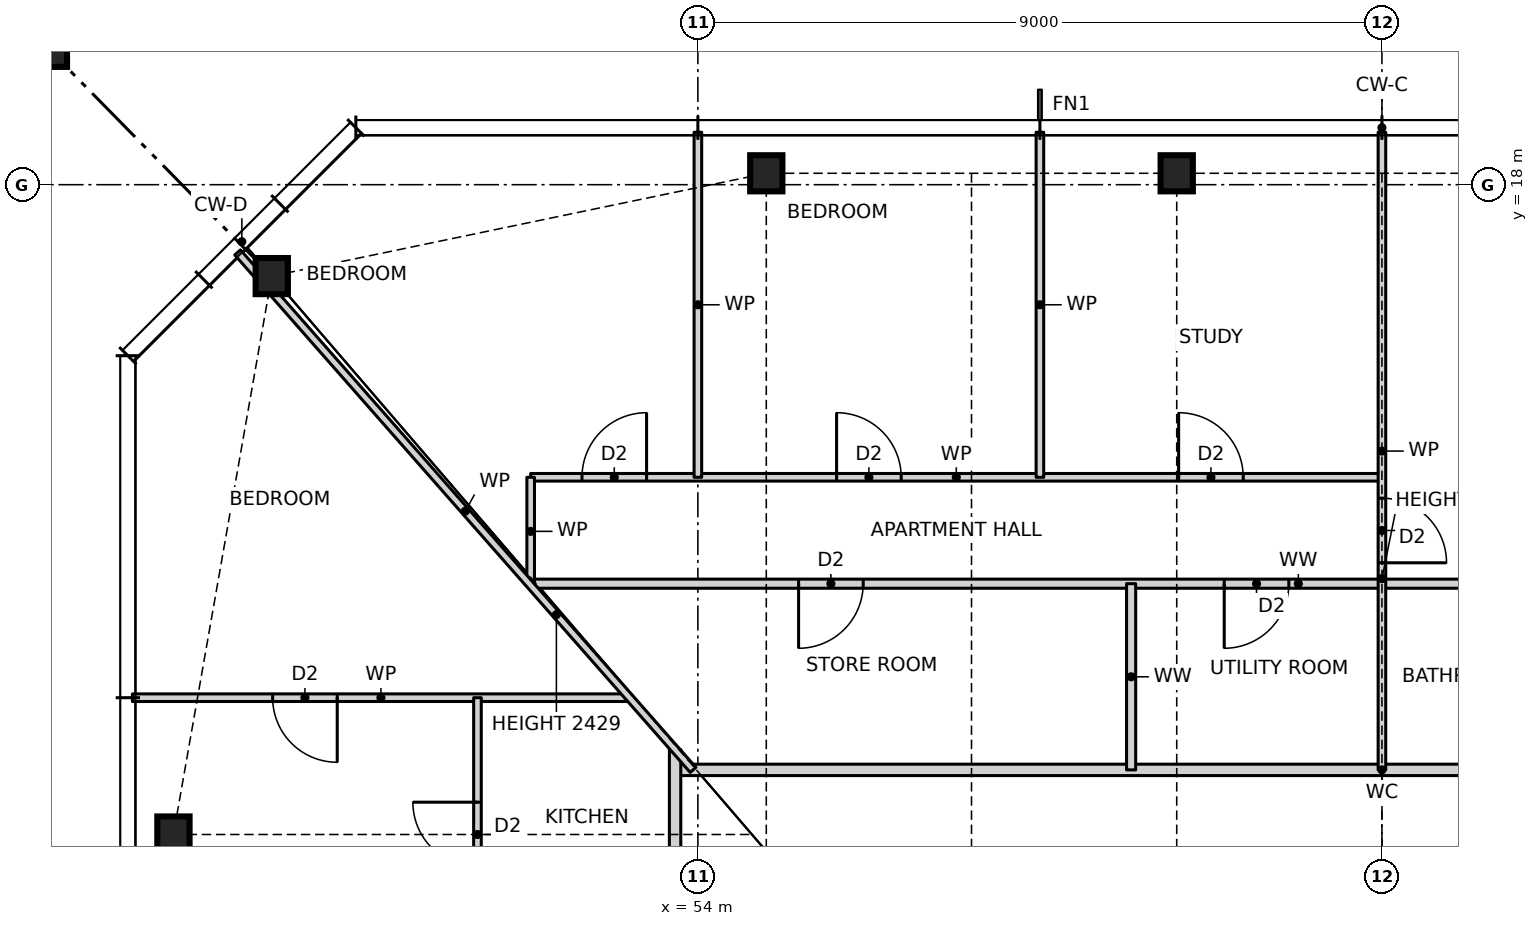
"""IFC4 building model, lengths in metres.
Left out: names, types, materials, properties, quantities, classifications, styles, units other than length and angle.
Written with IfcOpenShell. Run it as: python <this file> out.ifc"""

import sys

from ifc_helpers import new_model, si_unit, direction, frame, frame_2d, origin, origin_2d, place, context, subcontext, project, spatial, rectangle, hollow_rectangle, i_section, extrude, element, fill, save


model = new_model("IFC4")
c1 = context("Model", 3, precision=1e-05, world=origin(), true_north=direction((0.0, 1.0)))
c2 = subcontext(c1, "Body", "Model", "MODEL_VIEW")
j1 = project(units=[si_unit("LENGTHUNIT", "METRE"), si_unit("PLANEANGLEUNIT", "RADIAN")], contexts=[c1])
p1 = place(None, origin())
s1 = spatial("IfcSite", under=j1, at=p1, CompositionType="ELEMENT")
p2 = place(p1, origin())
s2 = spatial("IfcBuilding", under=s1, at=p2, CompositionType="ELEMENT")
p3 = place(p2, frame((0.0, 0.0, 57.0)))
s3 = spatial("IfcBuildingStorey", under=s2, at=p3, CompositionType="ELEMENT", Elevation=57.0)
for number, where, z_axis, x_axis in (
    (1, (60.3, 18.15, 0.0), (0.0, 0.0, 1.0), (1.0, 0.0, 0.0)),
    (2, (54.9, 18.15, 0.0), (0.0, 0.0, 1.0), (1.0, 0.0, 0.0)),
    (3, (48.394, 16.797, 0.0), (0.0, 0.0, 1.0), (1.0, 0.0, 0.0)),
    (4, (47.1, 9.45, 0.0), (0.0, 0.0, 1.0), (1.0, 0.0, 0.0)),
):
    element("IfcColumn", number, at=place(p3, frame(where, z_axis=z_axis, x_axis=x_axis)), inside=s3, PredefinedType="COLUMN", context=c2, shape_type="SweptSolid", body=[
        extrude(i_section(OverallWidth=0.424, OverallDepth=0.475, WebThickness=0.048, FlangeThickness=0.077, at=origin_2d()), origin(), (0.0, 0.0, 1.0), 3.5),
    ])
p4 = place(p3, frame((45.1, 20.15, 0.0), z_axis=(0.0, 0.0, 1.0), x_axis=(1.0, 0.0, 0.0)))
e5 = element("IfcColumn", 5, at=p4, inside=s3, PredefinedType="COLUMN", context=c2, shape_type="SweptSolid", body=[
    extrude(hollow_rectangle(XDim=1.2, YDim=1.2, WallThickness=0.07, at=origin_2d()), origin(), (0.0, 0.0, 1.0), 3.5),
])
p5 = place(p3, frame((53.7, 10.3, 0.0), z_axis=(0.0, 0.0, 1.0), x_axis=(1.0, 0.0, 0.0)))
e6 = element("IfcWall", 6, at=p5, inside=s3, PredefinedType="PARTITIONING", context=c2, shape_type="SweptSolid", body=[
    extrude(rectangle(XDim=18.6, YDim=0.15, at=frame_2d((9.3, 0.0))), origin(), (0.0, 0.0, 1.0), 3.27),
])
p6 = place(p5, frame((12.8, 0.0, 0.0)))
e7 = element("IfcOpeningElement", 7, at=p6, cuts=e6, PredefinedType="OPENING", context=c2, shape_type="SweptSolid", body=[
    extrude(rectangle(XDim=1.0, YDim=2.1, at=frame_2d((0.5, 1.05))), frame((0.0, 0.085, 0.0), z_axis=(0.0, -1.0, 0.0), x_axis=(1.0, 0.0, 0.0)), (0.0, 0.0, 1.0), 0.17),
])
p7 = place(p3, frame((46.56, 11.25, 0.0), z_axis=(0.0, 0.0, 1.0), x_axis=(1.0, 0.0, 0.0)))
e8 = element("IfcWall", 8, at=p7, inside=s3, PredefinedType="PARTITIONING", context=c2, shape_type="SweptSolid", body=[
    extrude(rectangle(XDim=6.54, YDim=0.1, at=frame_2d((3.27, 0.0))), origin(), (0.0, 0.0, 1.0), 3.27),
])
p8 = place(p7, frame((1.845, 0.0, 0.0)))
e9 = element("IfcOpeningElement", 9, at=p8, cuts=e8, PredefinedType="OPENING", context=c2, shape_type="SweptSolid", body=[
    extrude(rectangle(XDim=0.85, YDim=2.1, at=frame_2d((0.425, 1.05))), frame((0.0, 0.06, 0.0), z_axis=(0.0, -1.0, 0.0), x_axis=(1.0, 0.0, 0.0)), (0.0, 0.0, 1.0), 0.12),
])
p9 = place(p3, frame((51.8, 12.75, 0.0), z_axis=(0.0, 0.0, 1.0), x_axis=(1.0, 0.0, 0.0)))
e10 = element("IfcWall", 10, at=p9, inside=s3, PredefinedType="PARTITIONING", context=c2, shape_type="SweptSolid", body=[
    extrude(rectangle(XDim=20.2, YDim=0.12, at=frame_2d((10.1, 0.0))), origin(), (0.0, 0.0, 1.0), 3.27),
])
p10 = place(p9, frame((17.975, 0.0, 0.0)))
e11 = element("IfcOpeningElement", 11, at=p10, cuts=e10, PredefinedType="OPENING", context=c2, shape_type="SweptSolid", body=[
    extrude(rectangle(XDim=0.85, YDim=2.1, at=frame_2d((0.425, 1.05))), frame((0.0, 0.07, 0.0), z_axis=(0.0, -1.0, 0.0), x_axis=(1.0, 0.0, 0.0)), (0.0, 0.0, 1.0), 0.14),
])
p11 = place(p9, frame((14.775, 0.0, 0.0)))
e12 = element("IfcOpeningElement", 12, at=p11, cuts=e10, PredefinedType="OPENING", context=c2, shape_type="SweptSolid", body=[
    extrude(rectangle(XDim=0.85, YDim=2.1, at=frame_2d((0.425, 1.05))), frame((0.0, 0.07, 0.0), z_axis=(0.0, -1.0, 0.0), x_axis=(1.0, 0.0, 0.0)), (0.0, 0.0, 1.0), 0.14),
])
p12 = place(p9, frame((9.125, 0.0, 0.0)))
e13 = element("IfcOpeningElement", 13, at=p12, cuts=e10, PredefinedType="OPENING", context=c2, shape_type="SweptSolid", body=[
    extrude(rectangle(XDim=0.85, YDim=2.1, at=frame_2d((0.425, 1.05))), frame((0.0, 0.07, 0.0), z_axis=(0.0, -1.0, 0.0), x_axis=(1.0, 0.0, 0.0)), (0.0, 0.0, 1.0), 0.14),
])
p13 = place(p9, frame((3.525, 0.0, 0.0)))
e14 = element("IfcOpeningElement", 14, at=p13, cuts=e10, PredefinedType="OPENING", context=c2, shape_type="SweptSolid", body=[
    extrude(rectangle(XDim=0.85, YDim=2.1, at=frame_2d((0.425, 1.05))), frame((0.0, 0.07, 0.0), z_axis=(0.0, -1.0, 0.0), x_axis=(1.0, 0.0, 0.0)), (0.0, 0.0, 1.0), 0.14),
])
p14 = place(p3, frame((51.8, 14.15, 0.0), z_axis=(0.0, 0.0, 1.0), x_axis=(1.0, 0.0, 0.0)))
e15 = element("IfcWall", 15, at=p14, inside=s3, PredefinedType="PARTITIONING", context=c2, shape_type="SweptSolid", body=[
    extrude(rectangle(XDim=11.2, YDim=0.1, at=frame_2d((5.6, 0.0))), origin(), (0.0, 0.0, 1.0), 3.27),
])
p15 = place(p14, frame((8.525, 0.0, 0.0)))
e16 = element("IfcOpeningElement", 16, at=p15, cuts=e15, PredefinedType="OPENING", context=c2, shape_type="SweptSolid", body=[
    extrude(rectangle(XDim=0.85, YDim=2.1, at=frame_2d((0.425, 1.05))), frame((0.0, 0.06, 0.0), z_axis=(0.0, -1.0, 0.0), x_axis=(1.0, 0.0, 0.0)), (0.0, 0.0, 1.0), 0.12),
])
p16 = place(p14, frame((4.025, 0.0, 0.0)))
e17 = element("IfcOpeningElement", 17, at=p16, cuts=e15, PredefinedType="OPENING", context=c2, shape_type="SweptSolid", body=[
    extrude(rectangle(XDim=0.85, YDim=2.1, at=frame_2d((0.425, 1.05))), frame((0.0, 0.06, 0.0), z_axis=(0.0, -1.0, 0.0), x_axis=(1.0, 0.0, 0.0)), (0.0, 0.0, 1.0), 0.12),
])
p17 = place(p14, frame((0.675, 0.0, 0.0)))
e18 = element("IfcOpeningElement", 18, at=p17, cuts=e15, PredefinedType="OPENING", context=c2, shape_type="SweptSolid", body=[
    extrude(rectangle(XDim=0.85, YDim=2.1, at=frame_2d((0.425, 1.05))), frame((0.0, 0.06, 0.0), z_axis=(0.0, -1.0, 0.0), x_axis=(1.0, 0.0, 0.0)), (0.0, 0.0, 1.0), 0.12),
])
p18 = place(p3, frame((63.0, 10.3, 0.0), z_axis=(0.0, 0.0, 1.0), x_axis=(0.0, 1.0, 0.0)))
e19 = element("IfcWall", 19, at=p18, inside=s3, PredefinedType="PARTITIONING", context=c2, shape_type="SweptSolid", body=[
    extrude(rectangle(XDim=8.39, YDim=0.1, at=frame_2d((4.195, 0.0))), origin(), (0.0, 0.0, 1.0), 2.587),
])
p19 = place(p18, frame((2.725, 0.0, 0.0)))
e20 = element("IfcOpeningElement", 20, at=p19, cuts=e19, PredefinedType="OPENING", context=c2, shape_type="SweptSolid", body=[
    extrude(rectangle(XDim=0.85, YDim=2.1, at=frame_2d((0.425, 1.05))), frame((0.0, 0.06, 0.0), z_axis=(0.0, -1.0, 0.0), x_axis=(1.0, 0.0, 0.0)), (0.0, 0.0, 1.0), 0.12),
])
p20 = place(p3, frame((59.7, 10.3, 0.0), z_axis=(0.0, 0.0, 1.0), x_axis=(0.0, 1.0, 0.0)))
e21 = element("IfcWall", 21, at=p20, inside=s3, PredefinedType="PARTITIONING", context=c2, shape_type="SweptSolid", body=[
    extrude(rectangle(XDim=2.45, YDim=0.12, at=frame_2d((1.225, 0.0))), origin(), (0.0, 0.0, 1.0), 3.27),
])
for number, where, z_axis, x_axis in (
    (22, (58.5, 14.15, 0.0), (0.0, 0.0, 1.0), (0.0, 1.0, 0.0)),
    (23, (54.0, 14.15, 0.0), (0.0, 0.0, 1.0), (0.0, 1.0, 0.0)),
):
    element("IfcWall", number, at=place(p3, frame(where, z_axis=z_axis, x_axis=x_axis)), inside=s3, PredefinedType="PARTITIONING", context=c2, shape_type="SweptSolid", body=[
        extrude(rectangle(XDim=4.54, YDim=0.1, at=frame_2d((2.27, 0.0))), origin(), (0.0, 0.0, 1.0), 3.27),
    ])
p21 = place(p3, frame((53.7, -10.9, 0.0), z_axis=(0.0, 0.0, 1.0), x_axis=(0.0, 1.0, 0.0)))
e24 = element("IfcWall", 24, at=p21, inside=s3, PredefinedType="PARTITIONING", context=c2, shape_type="SweptSolid", body=[
    extrude(rectangle(XDim=21.468, YDim=0.15, at=frame_2d((10.734, 0.0))), origin(), (0.0, 0.0, 1.0), 3.27),
])
p22 = place(p21, frame((16.65, 0.0, 0.0)))
e25 = element("IfcOpeningElement", 25, at=p22, cuts=e24, PredefinedType="OPENING", context=c2, shape_type="SweptSolid", body=[
    extrude(rectangle(XDim=1.0, YDim=2.1, at=frame_2d((0.5, 1.05))), frame((0.0, 0.085, 0.0), z_axis=(0.0, -1.0, 0.0), x_axis=(1.0, 0.0, 0.0)), (0.0, 0.0, 1.0), 0.17),
])
p23 = place(p21, frame((11.25, 0.0, 0.0)))
e26 = element("IfcOpeningElement", 26, at=p23, cuts=e24, PredefinedType="OPENING", context=c2, shape_type="SweptSolid", body=[
    extrude(rectangle(XDim=1.0, YDim=2.1, at=frame_2d((0.5, 1.05))), frame((0.0, 0.085, 0.0), z_axis=(0.0, -1.0, 0.0), x_axis=(1.0, 0.0, 0.0)), (0.0, 0.0, 1.0), 0.17),
])
p24 = place(p3, frame((51.8, 12.727, 0.0), z_axis=(0.0, 0.0, 1.0), x_axis=(0.0, 1.0, 0.0)))
e27 = element("IfcWall", 27, at=p24, inside=s3, PredefinedType="PARTITIONING", context=c2, shape_type="SweptSolid", body=[
    extrude(rectangle(XDim=1.423, YDim=0.1, at=frame_2d((0.711, 0.0))), origin(), (0.0, 0.0, 1.0), 3.27),
])
p25 = place(p3, frame((51.1, 2.25, 0.0), z_axis=(0.0, 0.0, 1.0), x_axis=(0.0, 1.0, 0.0)))
e28 = element("IfcWall", 28, at=p25, inside=s3, PredefinedType="PARTITIONING", context=c2, shape_type="SweptSolid", body=[
    extrude(rectangle(XDim=9.0, YDim=0.1, at=frame_2d((4.5, 0.0))), origin(), (0.0, 0.0, 1.0), 3.27),
])
p26 = place(p25, frame((6.775, 0.0, 0.0)))
e29 = element("IfcOpeningElement", 29, at=p26, cuts=e28, PredefinedType="OPENING", context=c2, shape_type="SweptSolid", body=[
    extrude(rectangle(XDim=0.85, YDim=2.1, at=frame_2d((0.425, 1.05))), frame((0.0, 0.06, 0.0), z_axis=(0.0, -1.0, 0.0), x_axis=(1.0, 0.0, 0.0)), (0.0, 0.0, 1.0), 0.12),
])
p27 = place(p25, frame((3.575, 0.0, 0.0)))
e30 = element("IfcOpeningElement", 30, at=p27, cuts=e28, PredefinedType="OPENING", context=c2, shape_type="SweptSolid", body=[
    extrude(rectangle(XDim=0.85, YDim=2.1, at=frame_2d((0.425, 1.05))), frame((0.0, 0.06, 0.0), z_axis=(0.0, -1.0, 0.0), x_axis=(1.0, 0.0, 0.0)), (0.0, 0.0, 1.0), 0.12),
])
p28 = place(p3, frame((53.936, 10.3, 0.0), z_axis=(0.0, 0.0, 1.0), x_axis=(-0.660638210404, 0.750704439146, 0.0)))
e31 = element("IfcWall", 31, at=p28, inside=s3, PredefinedType="PARTITIONING", context=c2, shape_type="SweptSolid", body=[
    extrude(rectangle(XDim=9.07, YDim=0.1, at=frame_2d((4.535, 0.0))), origin(), (0.0, 0.0, 1.0), 2.429),
])
p29 = place(p19, frame((0.85, 0.0, 0.0), z_axis=(0.0, 0.0, 1.0), x_axis=(-1.0, 0.0, 0.0)))
e32 = element("IfcDoor", 32, at=p29, inside=s3, OperationType="SINGLE_SWING_RIGHT", PredefinedType="DOOR", context=c2, shape_type="SweptSolid", body=[
    extrude(rectangle(XDim=0.85, YDim=2.1, at=frame_2d((0.425, 1.05))), frame((0.0, 0.025, 0.0), z_axis=(0.0, -1.0, 0.0), x_axis=(1.0, 0.0, 0.0)), (0.0, 0.0, 1.0), 0.05),
])
fill(e20, e32)
p30 = place(p15, origin())
e33 = element("IfcDoor", 33, at=p30, inside=s3, OperationType="SINGLE_SWING_LEFT", PredefinedType="DOOR", context=c2, shape_type="SweptSolid", body=[
    extrude(rectangle(XDim=0.85, YDim=2.1, at=frame_2d((0.425, 1.05))), frame((0.0, 0.025, 0.0), z_axis=(0.0, -1.0, 0.0), x_axis=(1.0, 0.0, 0.0)), (0.0, 0.0, 1.0), 0.05),
])
fill(e16, e33)
p31 = place(p16, origin())
e34 = element("IfcDoor", 34, at=p31, inside=s3, OperationType="SINGLE_SWING_LEFT", PredefinedType="DOOR", context=c2, shape_type="SweptSolid", body=[
    extrude(rectangle(XDim=0.85, YDim=2.1, at=frame_2d((0.425, 1.05))), frame((0.0, 0.025, 0.0), z_axis=(0.0, -1.0, 0.0), x_axis=(1.0, 0.0, 0.0)), (0.0, 0.0, 1.0), 0.05),
])
fill(e17, e34)
p32 = place(p17, origin())
e35 = element("IfcDoor", 35, at=p32, inside=s3, OperationType="SINGLE_SWING_RIGHT", PredefinedType="DOOR", context=c2, shape_type="SweptSolid", body=[
    extrude(rectangle(XDim=0.85, YDim=2.1, at=frame_2d((0.425, 1.05))), frame((0.0, 0.025, 0.0), z_axis=(0.0, -1.0, 0.0), x_axis=(1.0, 0.0, 0.0)), (0.0, 0.0, 1.0), 0.05),
])
fill(e18, e35)
p33 = place(p12, frame((0.85, 0.0, 0.0), z_axis=(0.0, 0.0, 1.0), x_axis=(-1.0, 0.0, 0.0)))
e36 = element("IfcDoor", 36, at=p33, inside=s3, OperationType="SINGLE_SWING_RIGHT", PredefinedType="DOOR", context=c2, shape_type="SweptSolid", body=[
    extrude(rectangle(XDim=0.85, YDim=2.1, at=frame_2d((0.425, 1.05))), frame((0.0, 0.025, 0.0), z_axis=(0.0, -1.0, 0.0), x_axis=(1.0, 0.0, 0.0)), (0.0, 0.0, 1.0), 0.05),
])
fill(e13, e36)
p34 = place(p13, frame((0.85, 0.0, 0.0), z_axis=(0.0, 0.0, 1.0), x_axis=(-1.0, 0.0, 0.0)))
e37 = element("IfcDoor", 37, at=p34, inside=s3, OperationType="SINGLE_SWING_RIGHT", PredefinedType="DOOR", context=c2, shape_type="SweptSolid", body=[
    extrude(rectangle(XDim=0.85, YDim=2.1, at=frame_2d((0.425, 1.05))), frame((0.0, 0.025, 0.0), z_axis=(0.0, -1.0, 0.0), x_axis=(1.0, 0.0, 0.0)), (0.0, 0.0, 1.0), 0.05),
])
fill(e14, e37)
p35 = place(p26, origin())
e38 = element("IfcDoor", 38, at=p35, inside=s3, OperationType="SINGLE_SWING_RIGHT", PredefinedType="DOOR", context=c2, shape_type="SweptSolid", body=[
    extrude(rectangle(XDim=0.85, YDim=2.1, at=frame_2d((0.425, 1.05))), frame((0.0, 0.025, 0.0), z_axis=(0.0, -1.0, 0.0), x_axis=(1.0, 0.0, 0.0)), (0.0, 0.0, 1.0), 0.05),
])
fill(e29, e38)
p36 = place(p8, frame((0.85, 0.0, 0.0), z_axis=(0.0, 0.0, 1.0), x_axis=(-1.0, 0.0, 0.0)))
e39 = element("IfcDoor", 39, at=p36, inside=s3, OperationType="SINGLE_SWING_LEFT", PredefinedType="DOOR", context=c2, shape_type="SweptSolid", body=[
    extrude(rectangle(XDim=0.85, YDim=2.1, at=frame_2d((0.425, 1.05))), frame((0.0, 0.025, 0.0), z_axis=(0.0, -1.0, 0.0), x_axis=(1.0, 0.0, 0.0)), (0.0, 0.0, 1.0), 0.05),
])
fill(e9, e39)
save(model, sys.argv[1])
